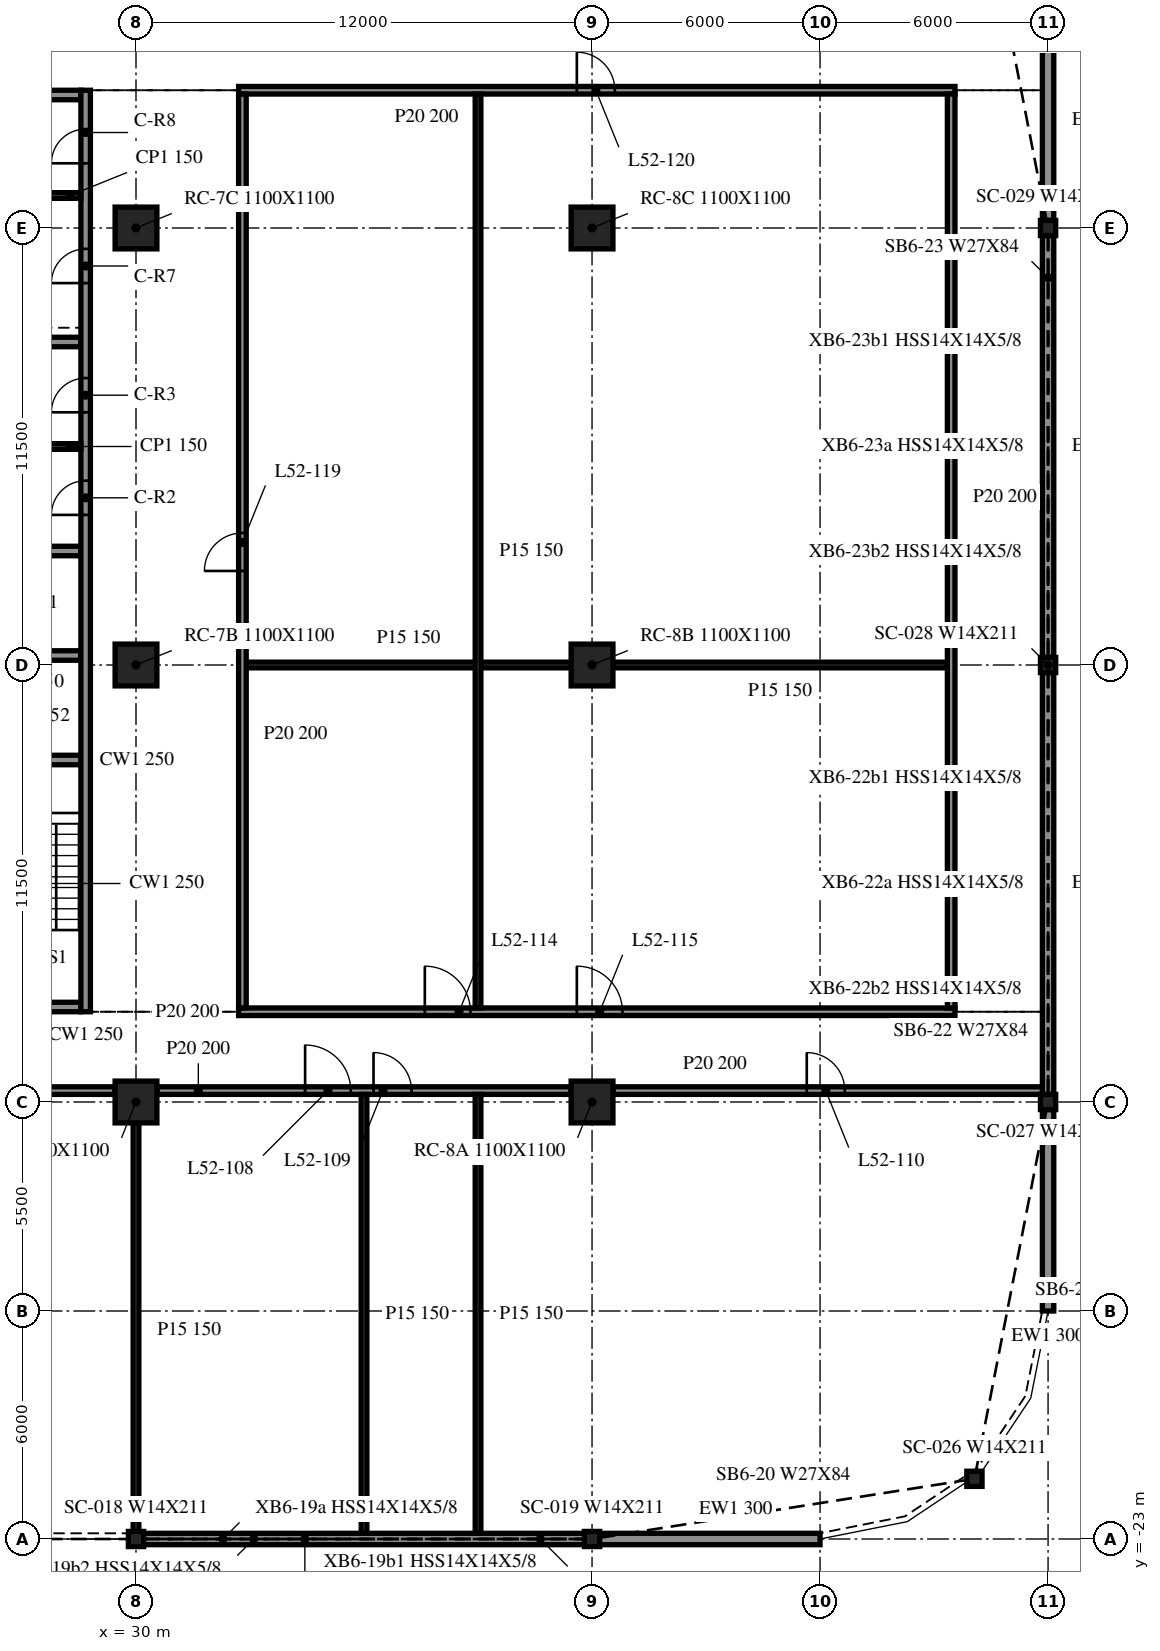
"""IFC4 building model, lengths in metres.
Left out: names, types, materials, properties, quantities, classifications, styles, units other than length and angle.
Written with IfcOpenShell. Run it as: python <this file> out.ifc"""

import sys

from ifc_helpers import new_model, si_unit, direction, frame, frame_2d, origin, origin_2d, place, context, subcontext, project, spatial, rectangle, i_section, extrude, element, fill, save


model = new_model("IFC4")
c1 = context("Model", 3, precision=1e-05, world=origin(), true_north=direction((0.0, 1.0)))
c2 = subcontext(c1, "Body", "Model", "MODEL_VIEW")
j1 = project(units=[si_unit("LENGTHUNIT", "METRE"), si_unit("PLANEANGLEUNIT", "RADIAN")], contexts=[c1])
p1 = place(None, origin())
s1 = spatial("IfcSite", under=j1, at=p1, CompositionType="ELEMENT")
p2 = place(p1, origin())
s2 = spatial("IfcBuilding", under=s1, at=p2, CompositionType="ELEMENT")
p3 = place(p2, frame((0.0, 0.0, 216.7)))
s3 = spatial("IfcBuildingStorey", under=s2, at=p3, CompositionType="ELEMENT", Elevation=216.7)
for number, where, z_axis, x_axis in (
    (1, (30.0, -11.5, -0.34), (0.0, 0.0, 1.0), (1.0, 0.0, 0.0)),
    (2, (30.0, 0.0, -0.34), (0.0, 0.0, 1.0), (1.0, 0.0, 0.0)),
    (3, (30.0, 11.5, -0.34), (0.0, 0.0, 1.0), (1.0, 0.0, 0.0)),
    (4, (42.0, -11.5, -0.34), (0.0, 0.0, 1.0), (1.0, 0.0, 0.0)),
    (5, (42.0, 0.0, -0.34), (0.0, 0.0, 1.0), (1.0, 0.0, 0.0)),
    (6, (42.0, 11.5, -0.34), (0.0, 0.0, 1.0), (1.0, 0.0, 0.0)),
):
    element("IfcColumn", number, at=place(p3, frame(where, z_axis=z_axis, x_axis=x_axis)), inside=s3, PredefinedType="COLUMN", context=c2, shape_type="SweptSolid", body=[
        extrude(rectangle(XDim=1.1, YDim=1.1, at=origin_2d()), origin(), (0.0, 0.0, 1.0), 3.8),
    ])
for number, where, z_axis, x_axis in (
    (7, (30.0, -23.0, -0.34), (0.0, 0.0, 1.0), (1.0, 0.0, 0.0)),
    (8, (42.0, -23.0, -0.34), (0.0, 0.0, 1.0), (1.0, 0.0, 0.0)),
    (9, (52.062, -21.416, -0.34), (0.0, 0.0, 1.0), (1.0, 0.0, 0.0)),
    (10, (54.0, -11.5, -0.34), (0.0, 0.0, 1.0), (1.0, 0.0, 0.0)),
    (11, (54.0, 0.0, -0.34), (0.0, 0.0, 1.0), (1.0, 0.0, 0.0)),
    (12, (54.0, 11.5, -0.34), (0.0, 0.0, 1.0), (1.0, 0.0, 0.0)),
):
    element("IfcColumn", number, at=place(p3, frame(where, z_axis=z_axis, x_axis=x_axis)), inside=s3, PredefinedType="COLUMN", context=c2, shape_type="SweptSolid", body=[
        extrude(i_section(OverallWidth=0.401, OverallDepth=0.399, WebThickness=0.025, FlangeThickness=0.04, at=origin_2d()), origin(), (0.0, 0.0, 1.0), 3.8),
    ])
p4 = place(p3, frame((30.012, -23.0, 0.0), z_axis=(0.0, 0.0, 1.0), x_axis=(1.0, 0.0, 0.0)))
e13 = element("IfcWall", 13, at=p4, inside=s3, PredefinedType="NOTDEFINED", context=c2, shape_type="SweptSolid", body=[
    extrude(rectangle(XDim=11.975, YDim=0.3, at=frame_2d((5.988, 0.0))), origin(), (0.0, 0.0, 1.0), 2.782),
])
p5 = place(p3, frame((42.012, -23.0, 0.0), z_axis=(0.0, 0.0, 1.0), x_axis=(1.0, 0.0, 0.0)))
e14 = element("IfcWall", 14, at=p5, inside=s3, PredefinedType="NOTDEFINED", context=c2, shape_type="SweptSolid", body=[
    extrude(rectangle(XDim=5.988, YDim=0.3, at=frame_2d((2.994, 0.0))), origin(), (0.0, 0.0, 1.0), 2.782),
])
p6 = place(p3, frame((54.0, -17.0, 0.0), z_axis=(0.0, 0.0, 1.0), x_axis=(0.0, 1.0, 0.0)))
e15 = element("IfcWall", 15, at=p6, inside=s3, PredefinedType="NOTDEFINED", context=c2, shape_type="SweptSolid", body=[
    extrude(rectangle(XDim=5.3, YDim=0.3, at=frame_2d((2.65, 0.0))), origin(), (0.0, 0.0, 1.0), 2.782),
])
for number, where, z_axis, x_axis in (
    (16, (54.0, -11.3, 0.0), (0.0, 0.0, 1.0), (0.0, 1.0, 0.0)),
    (17, (54.0, 0.2, 0.0), (0.0, 0.0, 1.0), (0.0, 1.0, 0.0)),
):
    element("IfcWall", number, at=place(p3, frame(where, z_axis=z_axis, x_axis=x_axis)), inside=s3, PredefinedType="NOTDEFINED", context=c2, shape_type="SweptSolid", body=[
        extrude(rectangle(XDim=11.1, YDim=0.3, at=frame_2d((5.55, 0.0))), origin(), (0.0, 0.0, 1.0), 2.782),
    ])
p7 = place(p3, frame((54.0, 11.7, 0.0), z_axis=(0.0, 0.0, 1.0), x_axis=(0.0, 1.0, 0.0)))
e18 = element("IfcWall", 18, at=p7, inside=s3, PredefinedType="NOTDEFINED", context=c2, shape_type="SweptSolid", body=[
    extrude(rectangle(XDim=5.3, YDim=0.3, at=frame_2d((2.65, 0.0))), origin(), (0.0, 0.0, 1.0), 2.782),
])
p8 = place(p3, frame((28.675, -9.125, 0.0), z_axis=(0.0, 0.0, 1.0), x_axis=(0.0, 1.0, 0.0)))
e19 = element("IfcWall", 19, at=p8, inside=s3, PredefinedType="SOLIDWALL", context=c2, shape_type="SweptSolid", body=[
    extrude(rectangle(XDim=24.25, YDim=0.25, at=frame_2d((12.125, 0.0))), origin(), (0.0, 0.0, 1.0), 3.46),
])
p9 = place(p8, frame((13.075, 0.0, 0.0)))
e20 = element("IfcOpeningElement", 20, at=p9, cuts=e19, PredefinedType="OPENING", context=c2, shape_type="SweptSolid", body=[
    extrude(rectangle(XDim=0.9, YDim=2.1, at=frame_2d((0.45, 1.05))), frame((0.0, 0.135, 0.0), z_axis=(0.0, -1.0, 0.0), x_axis=(1.0, 0.0, 0.0)), (0.0, 0.0, 1.0), 0.27),
])
p10 = place(p8, frame((15.775, 0.0, 0.0)))
e21 = element("IfcOpeningElement", 21, at=p10, cuts=e19, PredefinedType="OPENING", context=c2, shape_type="SweptSolid", body=[
    extrude(rectangle(XDim=0.9, YDim=2.1, at=frame_2d((0.45, 1.05))), frame((0.0, 0.135, 0.0), z_axis=(0.0, -1.0, 0.0), x_axis=(1.0, 0.0, 0.0)), (0.0, 0.0, 1.0), 0.27),
])
p11 = place(p8, frame((19.175, 0.0, 0.0)))
e22 = element("IfcOpeningElement", 22, at=p11, cuts=e19, PredefinedType="OPENING", context=c2, shape_type="SweptSolid", body=[
    extrude(rectangle(XDim=0.9, YDim=2.1, at=frame_2d((0.45, 1.05))), frame((0.0, 0.135, 0.0), z_axis=(0.0, -1.0, 0.0), x_axis=(1.0, 0.0, 0.0)), (0.0, 0.0, 1.0), 0.27),
])
p12 = place(p8, frame((22.327, 0.0, 0.0)))
e23 = element("IfcOpeningElement", 23, at=p12, cuts=e19, PredefinedType="OPENING", context=c2, shape_type="SweptSolid", body=[
    extrude(rectangle(XDim=0.9, YDim=2.1, at=frame_2d((0.45, 1.05))), frame((0.0, 0.135, 0.0), z_axis=(0.0, -1.0, 0.0), x_axis=(1.0, 0.0, 0.0)), (0.0, 0.0, 1.0), 0.27),
])
p13 = place(p3, frame((28.55, -9.0, 0.0), z_axis=(0.0, 0.0, 1.0), x_axis=(-1.0, 0.0, 0.0)))
e24 = element("IfcWall", 24, at=p13, inside=s3, PredefinedType="SOLIDWALL", context=c2, shape_type="SweptSolid", body=[
    extrude(rectangle(XDim=9.1, YDim=0.25, at=frame_2d((4.55, 0.0))), origin(), (0.0, 0.0, 1.0), 3.46),
])
p14 = place(p13, frame((3.65, 0.0, 0.0)))
e25 = element("IfcOpeningElement", 25, at=p14, cuts=e24, PredefinedType="OPENING", context=c2, shape_type="SweptSolid", body=[
    extrude(rectangle(XDim=1.8, YDim=2.1, at=frame_2d((0.9, 1.05))), frame((0.0, 0.135, 0.0), z_axis=(0.0, -1.0, 0.0), x_axis=(1.0, 0.0, 0.0)), (0.0, 0.0, 1.0), 0.27),
])
p15 = place(p3, frame((19.45, 15.0, 0.0), z_axis=(0.0, 0.0, 1.0), x_axis=(1.0, 0.0, 0.0)))
e26 = element("IfcWall", 26, at=p15, inside=s3, PredefinedType="SOLIDWALL", context=c2, shape_type="SweptSolid", body=[
    extrude(rectangle(XDim=9.1, YDim=0.25, at=frame_2d((4.55, 0.0))), origin(), (0.0, 0.0, 1.0), 3.46),
])
p16 = place(p15, frame((3.65, 0.0, 0.0)))
e27 = element("IfcOpeningElement", 27, at=p16, cuts=e26, PredefinedType="OPENING", context=c2, shape_type="SweptSolid", body=[
    extrude(rectangle(XDim=1.8, YDim=2.1, at=frame_2d((0.9, 1.05))), frame((0.0, 0.135, 0.0), z_axis=(0.0, -1.0, 0.0), x_axis=(1.0, 0.0, 0.0)), (0.0, 0.0, 1.0), 0.27),
])
for number, where, z_axis, x_axis in (
    (28, (25.7, -2.5, 0.0), (0.0, 0.0, 1.0), (1.0, 0.0, 0.0)),
    (29, (25.7, 0.25, 0.0), (0.0, 0.0, 1.0), (1.0, 0.0, 0.0)),
    (30, (25.7, 3.0, 0.0), (0.0, 0.0, 1.0), (1.0, 0.0, 0.0)),
    (31, (25.7, 8.5, 0.0), (0.0, 0.0, 1.0), (1.0, 0.0, 0.0)),
):
    element("IfcWall", number, at=place(p3, frame(where, z_axis=z_axis, x_axis=x_axis)), inside=s3, PredefinedType="SOLIDWALL", context=c2, shape_type="SweptSolid", body=[
        extrude(rectangle(XDim=2.85, YDim=0.25, at=frame_2d((1.425, 0.0))), origin(), (0.0, 0.0, 1.0), 3.46),
    ])
for number, where, z_axis, x_axis in (
    (32, (25.7, 5.75, 0.0), (0.0, 0.0, 1.0), (1.0, 0.0, 0.0)),
    (33, (25.7, 12.355, 0.0), (0.0, 0.0, 1.0), (1.0, 0.0, 0.0)),
):
    element("IfcWall", number, at=place(p3, frame(where, z_axis=z_axis, x_axis=x_axis)), inside=s3, PredefinedType="PARTITIONING", context=c2, shape_type="SweptSolid", body=[
        extrude(rectangle(XDim=2.85, YDim=0.15, at=frame_2d((1.425, 0.0))), origin(), (0.0, 0.0, 1.0), 3.46),
    ])
p17 = place(p3, frame((18.55, -11.2, 0.0), z_axis=(0.0, 0.0, 1.0), x_axis=(1.0, 0.0, 0.0)))
e34 = element("IfcWall", 34, at=p17, inside=s3, PredefinedType="PARTITIONING", context=c2, shape_type="SweptSolid", body=[
    extrude(rectangle(XDim=10.9, YDim=0.2, at=frame_2d((5.45, 0.0))), origin(), (0.0, 0.0, 1.0), 3.46),
])
p18 = place(p17, frame((4.9, 0.0, 0.0)))
e35 = element("IfcOpeningElement", 35, at=p18, cuts=e34, PredefinedType="OPENING", context=c2, shape_type="SweptSolid", body=[
    extrude(rectangle(XDim=1.0, YDim=2.1, at=frame_2d((0.5, 1.05))), frame((0.0, 0.11, 0.0), z_axis=(0.0, -1.0, 0.0), x_axis=(1.0, 0.0, 0.0)), (0.0, 0.0, 1.0), 0.22),
])
p19 = place(p3, frame((30.55, -11.2, 0.0), z_axis=(0.0, 0.0, 1.0), x_axis=(1.0, 0.0, 0.0)))
e36 = element("IfcWall", 36, at=p19, inside=s3, PredefinedType="PARTITIONING", context=c2, shape_type="SweptSolid", body=[
    extrude(rectangle(XDim=10.9, YDim=0.2, at=frame_2d((5.45, 0.0))), origin(), (0.0, 0.0, 1.0), 3.46),
])
p20 = place(p19, frame((3.9, 0.0, 0.0)))
e37 = element("IfcOpeningElement", 37, at=p20, cuts=e36, PredefinedType="OPENING", context=c2, shape_type="SweptSolid", body=[
    extrude(rectangle(XDim=1.2, YDim=2.1, at=frame_2d((0.6, 1.05))), frame((0.0, 0.11, 0.0), z_axis=(0.0, -1.0, 0.0), x_axis=(1.0, 0.0, 0.0)), (0.0, 0.0, 1.0), 0.22),
])
p21 = place(p19, frame((5.7, 0.0, 0.0)))
e38 = element("IfcOpeningElement", 38, at=p21, cuts=e36, PredefinedType="OPENING", context=c2, shape_type="SweptSolid", body=[
    extrude(rectangle(XDim=1.0, YDim=2.1, at=frame_2d((0.5, 1.05))), frame((0.0, 0.11, 0.0), z_axis=(0.0, -1.0, 0.0), x_axis=(1.0, 0.0, 0.0)), (0.0, 0.0, 1.0), 0.22),
])
p22 = place(p3, frame((42.55, -11.2, 0.0), z_axis=(0.0, 0.0, 1.0), x_axis=(1.0, 0.0, 0.0)))
e39 = element("IfcWall", 39, at=p22, inside=s3, PredefinedType="PARTITIONING", context=c2, shape_type="SweptSolid", body=[
    extrude(rectangle(XDim=11.3, YDim=0.2, at=frame_2d((5.65, 0.0))), origin(), (0.0, 0.0, 1.0), 3.46),
])
p23 = place(p22, frame((5.1, 0.0, 0.0)))
e40 = element("IfcOpeningElement", 40, at=p23, cuts=e39, PredefinedType="OPENING", context=c2, shape_type="SweptSolid", body=[
    extrude(rectangle(XDim=1.0, YDim=2.1, at=frame_2d((0.5, 1.05))), frame((0.0, 0.11, 0.0), z_axis=(0.0, -1.0, 0.0), x_axis=(1.0, 0.0, 0.0)), (0.0, 0.0, 1.0), 0.22),
])
p24 = place(p3, frame((32.7, -9.125, 0.0), z_axis=(0.0, 0.0, 1.0), x_axis=(1.0, 0.0, 0.0)))
e41 = element("IfcWall", 41, at=p24, inside=s3, PredefinedType="PARTITIONING", context=c2, shape_type="SweptSolid", body=[
    extrude(rectangle(XDim=18.85, YDim=0.2, at=frame_2d((9.425, 0.0))), origin(), (0.0, 0.0, 1.0), 3.46),
])
p25 = place(p24, frame((4.9, 0.0, 0.0)))
e42 = element("IfcOpeningElement", 42, at=p25, cuts=e41, PredefinedType="OPENING", context=c2, shape_type="SweptSolid", body=[
    extrude(rectangle(XDim=1.2, YDim=2.1, at=frame_2d((0.6, 1.05))), frame((0.0, 0.11, 0.0), z_axis=(0.0, -1.0, 0.0), x_axis=(1.0, 0.0, 0.0)), (0.0, 0.0, 1.0), 0.22),
])
p26 = place(p24, frame((8.9, 0.0, 0.0)))
e43 = element("IfcOpeningElement", 43, at=p26, cuts=e41, PredefinedType="OPENING", context=c2, shape_type="SweptSolid", body=[
    extrude(rectangle(XDim=1.2, YDim=2.1, at=frame_2d((0.6, 1.05))), frame((0.0, 0.11, 0.0), z_axis=(0.0, -1.0, 0.0), x_axis=(1.0, 0.0, 0.0)), (0.0, 0.0, 1.0), 0.22),
])
p27 = place(p3, frame((32.9, 0.0, 0.0), z_axis=(0.0, 0.0, 1.0), x_axis=(1.0, 0.0, 0.0)))
e44 = element("IfcWall", 44, at=p27, inside=s3, PredefinedType="PARTITIONING", context=c2, shape_type="SweptSolid", body=[
    extrude(rectangle(XDim=8.55, YDim=0.15, at=frame_2d((4.275, 0.0))), origin(), (0.0, 0.0, 1.0), 3.46),
])
p28 = place(p3, frame((42.55, 0.0, 0.0), z_axis=(0.0, 0.0, 1.0), x_axis=(1.0, 0.0, 0.0)))
e45 = element("IfcWall", 45, at=p28, inside=s3, PredefinedType="PARTITIONING", context=c2, shape_type="SweptSolid", body=[
    extrude(rectangle(XDim=8.8, YDim=0.15, at=frame_2d((4.4, 0.0))), origin(), (0.0, 0.0, 1.0), 3.46),
])
p29 = place(p3, frame((32.7, 15.125, 0.0), z_axis=(0.0, 0.0, 1.0), x_axis=(1.0, 0.0, 0.0)))
e46 = element("IfcWall", 46, at=p29, inside=s3, PredefinedType="PARTITIONING", context=c2, shape_type="SweptSolid", body=[
    extrude(rectangle(XDim=18.85, YDim=0.2, at=frame_2d((9.425, 0.0))), origin(), (0.0, 0.0, 1.0), 3.46),
])
p30 = place(p29, frame((8.9, 0.0, 0.0)))
e47 = element("IfcOpeningElement", 47, at=p30, cuts=e46, PredefinedType="OPENING", context=c2, shape_type="SweptSolid", body=[
    extrude(rectangle(XDim=1.0, YDim=2.1, at=frame_2d((0.5, 1.05))), frame((0.0, 0.11, 0.0), z_axis=(0.0, -1.0, 0.0), x_axis=(1.0, 0.0, 0.0)), (0.0, 0.0, 1.0), 0.22),
])
p31 = place(p3, frame((30.0, -22.975, 0.0), z_axis=(0.0, 0.0, 1.0), x_axis=(0.0, 1.0, 0.0)))
e48 = element("IfcWall", 48, at=p31, inside=s3, PredefinedType="PARTITIONING", context=c2, shape_type="SweptSolid", body=[
    extrude(rectangle(XDim=10.925, YDim=0.15, at=frame_2d((5.462, 0.0))), origin(), (0.0, 0.0, 1.0), 3.46),
])
p32 = place(p3, frame((32.8, -9.025, 0.0), z_axis=(0.0, 0.0, 1.0), x_axis=(0.0, 1.0, 0.0)))
e49 = element("IfcWall", 49, at=p32, inside=s3, PredefinedType="PARTITIONING", context=c2, shape_type="SweptSolid", body=[
    extrude(rectangle(XDim=24.05, YDim=0.2, at=frame_2d((12.025, 0.0))), origin(), (0.0, 0.0, 1.0), 3.46),
])
p33 = place(p32, frame((11.5, 0.0, 0.0)))
e50 = element("IfcOpeningElement", 50, at=p33, cuts=e49, PredefinedType="OPENING", context=c2, shape_type="SweptSolid", body=[
    extrude(rectangle(XDim=1.0, YDim=2.1, at=frame_2d((0.5, 1.05))), frame((0.0, 0.11, 0.0), z_axis=(0.0, -1.0, 0.0), x_axis=(1.0, 0.0, 0.0)), (0.0, 0.0, 1.0), 0.22),
])
for number, where, z_axis, x_axis in (
    (51, (36.0, -22.85, 0.0), (0.0, 0.0, 1.0), (0.0, 1.0, 0.0)),
    (52, (39.0, -22.85, 0.0), (0.0, 0.0, 1.0), (0.0, 1.0, 0.0)),
):
    element("IfcWall", number, at=place(p3, frame(where, z_axis=z_axis, x_axis=x_axis)), inside=s3, PredefinedType="PARTITIONING", context=c2, shape_type="SweptSolid", body=[
        extrude(rectangle(XDim=11.55, YDim=0.15, at=frame_2d((5.775, 0.0))), origin(), (0.0, 0.0, 1.0), 3.46),
    ])
p34 = place(p3, frame((39.0, -9.025, 0.0), z_axis=(0.0, 0.0, 1.0), x_axis=(0.0, 1.0, 0.0)))
e53 = element("IfcWall", 53, at=p34, inside=s3, PredefinedType="PARTITIONING", context=c2, shape_type="SweptSolid", body=[
    extrude(rectangle(XDim=24.05, YDim=0.15, at=frame_2d((12.025, 0.0))), origin(), (0.0, 0.0, 1.0), 3.46),
])
p35 = place(p3, frame((51.45, -9.025, 0.0), z_axis=(0.0, 0.0, 1.0), x_axis=(0.0, 1.0, 0.0)))
e54 = element("IfcWall", 54, at=p35, inside=s3, PredefinedType="PARTITIONING", context=c2, shape_type="SweptSolid", body=[
    extrude(rectangle(XDim=24.05, YDim=0.2, at=frame_2d((12.025, 0.0))), origin(), (0.0, 0.0, 1.0), 3.46),
])
p36 = place(p9, origin())
e55 = element("IfcDoor", 55, at=p36, inside=s3, OperationType="SINGLE_SWING_RIGHT", PredefinedType="DOOR", context=c2, shape_type="SweptSolid", body=[
    extrude(rectangle(XDim=0.9, YDim=2.1, at=frame_2d((0.45, 1.05))), frame((0.0, 0.025, 0.0), z_axis=(0.0, -1.0, 0.0), x_axis=(1.0, 0.0, 0.0)), (0.0, 0.0, 1.0), 0.05),
])
fill(e20, e55)
p37 = place(p10, origin())
e56 = element("IfcDoor", 56, at=p37, inside=s3, OperationType="SINGLE_SWING_LEFT", PredefinedType="DOOR", context=c2, shape_type="SweptSolid", body=[
    extrude(rectangle(XDim=0.9, YDim=2.1, at=frame_2d((0.45, 1.05))), frame((0.0, 0.025, 0.0), z_axis=(0.0, -1.0, 0.0), x_axis=(1.0, 0.0, 0.0)), (0.0, 0.0, 1.0), 0.05),
])
fill(e21, e56)
p38 = place(p11, origin())
e57 = element("IfcDoor", 57, at=p38, inside=s3, OperationType="SINGLE_SWING_LEFT", PredefinedType="DOOR", context=c2, shape_type="SweptSolid", body=[
    extrude(rectangle(XDim=0.9, YDim=2.1, at=frame_2d((0.45, 1.05))), frame((0.0, 0.025, 0.0), z_axis=(0.0, -1.0, 0.0), x_axis=(1.0, 0.0, 0.0)), (0.0, 0.0, 1.0), 0.05),
])
fill(e22, e57)
p39 = place(p12, origin())
e58 = element("IfcDoor", 58, at=p39, inside=s3, OperationType="SINGLE_SWING_RIGHT", PredefinedType="DOOR", context=c2, shape_type="SweptSolid", body=[
    extrude(rectangle(XDim=0.9, YDim=2.1, at=frame_2d((0.45, 1.05))), frame((0.0, 0.025, 0.0), z_axis=(0.0, -1.0, 0.0), x_axis=(1.0, 0.0, 0.0)), (0.0, 0.0, 1.0), 0.05),
])
fill(e23, e58)
p40 = place(p20, origin())
e59 = element("IfcDoor", 59, at=p40, inside=s3, OperationType="SINGLE_SWING_RIGHT", PredefinedType="DOOR", context=c2, shape_type="SweptSolid", body=[
    extrude(rectangle(XDim=1.2, YDim=2.1, at=frame_2d((0.6, 1.05))), frame((0.0, 0.025, 0.0), z_axis=(0.0, -1.0, 0.0), x_axis=(1.0, 0.0, 0.0)), (0.0, 0.0, 1.0), 0.05),
])
fill(e37, e59)
p41 = place(p21, origin())
e60 = element("IfcDoor", 60, at=p41, inside=s3, OperationType="SINGLE_SWING_LEFT", PredefinedType="DOOR", context=c2, shape_type="SweptSolid", body=[
    extrude(rectangle(XDim=1.0, YDim=2.1, at=frame_2d((0.5, 1.05))), frame((0.0, 0.025, 0.0), z_axis=(0.0, -1.0, 0.0), x_axis=(1.0, 0.0, 0.0)), (0.0, 0.0, 1.0), 0.05),
])
fill(e38, e60)
p42 = place(p23, origin())
e61 = element("IfcDoor", 61, at=p42, inside=s3, OperationType="SINGLE_SWING_RIGHT", PredefinedType="DOOR", context=c2, shape_type="SweptSolid", body=[
    extrude(rectangle(XDim=1.0, YDim=2.1, at=frame_2d((0.5, 1.05))), frame((0.0, 0.025, 0.0), z_axis=(0.0, -1.0, 0.0), x_axis=(1.0, 0.0, 0.0)), (0.0, 0.0, 1.0), 0.05),
])
fill(e40, e61)
p43 = place(p25, origin())
e62 = element("IfcDoor", 62, at=p43, inside=s3, OperationType="SINGLE_SWING_LEFT", PredefinedType="DOOR", context=c2, shape_type="SweptSolid", body=[
    extrude(rectangle(XDim=1.2, YDim=2.1, at=frame_2d((0.6, 1.05))), frame((0.0, 0.025, 0.0), z_axis=(0.0, -1.0, 0.0), x_axis=(1.0, 0.0, 0.0)), (0.0, 0.0, 1.0), 0.05),
])
fill(e42, e62)
p44 = place(p26, origin())
e63 = element("IfcDoor", 63, at=p44, inside=s3, OperationType="SINGLE_SWING_RIGHT", PredefinedType="DOOR", context=c2, shape_type="SweptSolid", body=[
    extrude(rectangle(XDim=1.2, YDim=2.1, at=frame_2d((0.6, 1.05))), frame((0.0, 0.025, 0.0), z_axis=(0.0, -1.0, 0.0), x_axis=(1.0, 0.0, 0.0)), (0.0, 0.0, 1.0), 0.05),
])
fill(e43, e63)
p45 = place(p33, origin())
e64 = element("IfcDoor", 64, at=p45, inside=s3, OperationType="SINGLE_SWING_RIGHT", PredefinedType="DOOR", context=c2, shape_type="SweptSolid", body=[
    extrude(rectangle(XDim=1.0, YDim=2.1, at=frame_2d((0.5, 1.05))), frame((0.0, 0.025, 0.0), z_axis=(0.0, -1.0, 0.0), x_axis=(1.0, 0.0, 0.0)), (0.0, 0.0, 1.0), 0.05),
])
fill(e50, e64)
p46 = place(p30, origin())
e65 = element("IfcDoor", 65, at=p46, inside=s3, OperationType="SINGLE_SWING_RIGHT", PredefinedType="DOOR", context=c2, shape_type="SweptSolid", body=[
    extrude(rectangle(XDim=1.0, YDim=2.1, at=frame_2d((0.5, 1.05))), frame((0.0, 0.025, 0.0), z_axis=(0.0, -1.0, 0.0), x_axis=(1.0, 0.0, 0.0)), (0.0, 0.0, 1.0), 0.05),
])
fill(e47, e65)
save(model, sys.argv[1])
